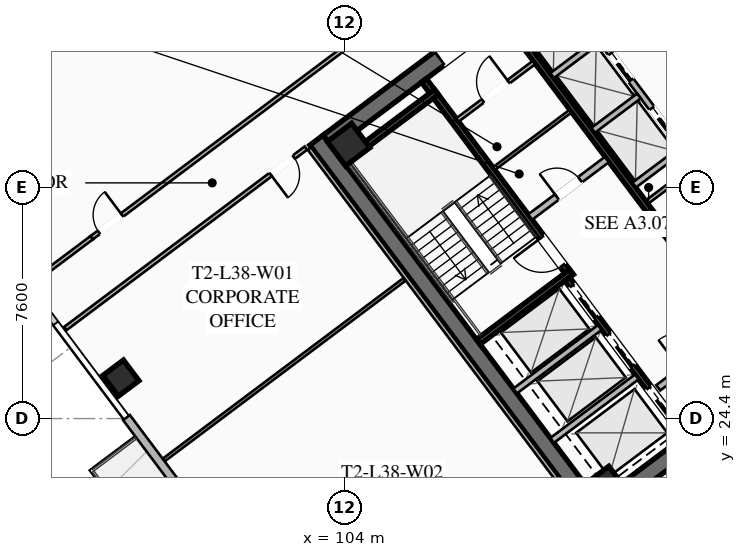
"""IFC4 building model, lengths in metres.
Left out: names, types, materials, properties, quantities, classifications, styles, units other than length and angle.
Written with IfcOpenShell. Run it as: python <this file> out.ifc"""

import sys

from ifc_helpers import new_model, si_unit, direction, frame, frame_2d, origin, origin_2d, place, context, subcontext, project, spatial, rectangle, hollow_rectangle, extrude, element, fill, save


model = new_model("IFC4")
c1 = context("Model", 3, precision=1e-05, world=origin(), true_north=direction((0.0, 1.0)))
c2 = subcontext(c1, "Body", "Model", "MODEL_VIEW")
j1 = project(units=[si_unit("LENGTHUNIT", "METRE"), si_unit("PLANEANGLEUNIT", "RADIAN")], contexts=[c1])
p1 = place(None, origin())
s1 = spatial("IfcSite", under=j1, at=p1, CompositionType="ELEMENT")
p2 = place(p1, origin())
s2 = spatial("IfcBuilding", under=s1, at=p2, CompositionType="ELEMENT")
p3 = place(p2, frame((0.0, 0.0, 142.8)))
s3 = spatial("IfcBuildingStorey", under=s2, at=p3, CompositionType="ELEMENT", Elevation=142.8)
p4 = place(p3, frame((112.436, 21.077, 0.0), z_axis=(0.0, 0.0, 1.0), x_axis=(-0.600005007985, 0.799996243986, 0.0)))
e1 = element("IfcWall", 1, at=p4, inside=s3, PredefinedType="SHEAR", context=c2, shape_type="SweptSolid", body=[
    extrude(rectangle(XDim=15.6, YDim=0.55, at=frame_2d((7.8, 0.0))), origin(), (0.0, 0.0, 1.0), 3.55),
])
p5 = place(p3, frame((124.539, 30.498, 0.0), z_axis=(0.0, 0.0, 1.0), x_axis=(-0.799998054672, -0.600002593761, 0.0)))
e2 = element("IfcWall", 2, at=p5, inside=s3, PredefinedType="SHEAR", context=c2, shape_type="SweptSolid", body=[
    extrude(rectangle(XDim=15.06, YDim=0.55, at=frame_2d((7.53, 0.0))), origin(), (0.0, 0.0, 1.0), 3.55),
])
p6 = place(p5, frame((9.23, 0.0, 0.0)))
e3 = element("IfcOpeningElement", 3, at=p6, cuts=e2, PredefinedType="OPENING", context=c2, shape_type="SweptSolid", body=[
    extrude(rectangle(XDim=1.25, YDim=2.25, at=frame_2d((0.625, 1.125))), frame((0.0, 0.285, 0.0), z_axis=(0.0, -1.0, 0.0), x_axis=(1.0, 0.0, 0.0)), (0.0, 0.0, 1.0), 0.57),
])
p7 = place(p5, frame((4.18, 0.0, 0.0)))
e4 = element("IfcOpeningElement", 4, at=p7, cuts=e2, PredefinedType="OPENING", context=c2, shape_type="SweptSolid", body=[
    extrude(rectangle(XDim=1.25, YDim=2.25, at=frame_2d((0.625, 1.125))), frame((0.0, 0.285, 0.0), z_axis=(0.0, -1.0, 0.0), x_axis=(1.0, 0.0, 0.0)), (0.0, 0.0, 1.0), 0.57),
])
p8 = place(p3, frame((103.461, 33.502, 0.0), z_axis=(0.0, 0.0, 1.0), x_axis=(0.799998054672, 0.600002593761, 0.0)))
e5 = element("IfcWall", 5, at=p8, inside=s3, PredefinedType="SHEAR", context=c2, shape_type="SweptSolid", body=[
    extrude(rectangle(XDim=15.06, YDim=0.55, at=frame_2d((7.53, 0.0))), origin(), (0.0, 0.0, 1.0), 3.55),
])
p9 = place(p8, frame((4.58, 0.0, 0.0)))
e6 = element("IfcOpeningElement", 6, at=p9, cuts=e5, PredefinedType="OPENING", context=c2, shape_type="SweptSolid", body=[
    extrude(rectangle(XDim=1.25, YDim=2.25, at=frame_2d((0.625, 1.125))), frame((0.0, 0.285, 0.0), z_axis=(0.0, -1.0, 0.0), x_axis=(1.0, 0.0, 0.0)), (0.0, 0.0, 1.0), 0.57),
])
p10 = place(p8, frame((9.63, 0.0, 0.0)))
e7 = element("IfcOpeningElement", 7, at=p10, cuts=e5, PredefinedType="OPENING", context=c2, shape_type="SweptSolid", body=[
    extrude(rectangle(XDim=1.25, YDim=2.25, at=frame_2d((0.625, 1.125))), frame((0.0, 0.285, 0.0), z_axis=(0.0, -1.0, 0.0), x_axis=(1.0, 0.0, 0.0)), (0.0, 0.0, 1.0), 0.57),
])
for number, where, z_axis, x_axis in (
    (8, (112.59, 22.13, 0.0), (0.0, 0.0, 1.0), (0.8, 0.6, 0.0)),
    (9, (104.13, 33.41, 0.0), (0.0, 0.0, 1.0), (0.8, 0.6, 0.0)),
):
    element("IfcColumn", number, at=place(p3, frame(where, z_axis=z_axis, x_axis=x_axis)), inside=s3, PredefinedType="COLUMN", context=c2, shape_type="SweptSolid", body=[
        extrude(hollow_rectangle(XDim=1.0, YDim=1.0, WallThickness=0.04, at=origin_2d()), origin(), (0.0, 0.0, 1.0), 3.37),
    ])
p11 = place(p3, frame((96.64, 25.73, 0.0), z_axis=(0.0, 0.0, 1.0), x_axis=(0.799999996291, 0.600000004945, 0.0)))
e10 = element("IfcColumn", 10, at=p11, inside=s3, PredefinedType="COLUMN", context=c2, shape_type="SweptSolid", body=[
    extrude(hollow_rectangle(XDim=0.85, YDim=0.85, WallThickness=0.035, at=origin_2d()), origin(), (0.0, 0.0, 1.0), 3.37),
])
p12 = place(p3, frame((101.926, 17.632, 0.0), z_axis=(0.0, 0.0, 1.0), x_axis=(-0.600018382406, 0.799986212866, 0.0)))
e11 = element("IfcWall", 11, at=p12, inside=s3, PredefinedType="SOLIDWALL", context=c2, shape_type="SweptSolid", body=[
    extrude(rectangle(XDim=8.5, YDim=0.28, at=frame_2d((4.25, 0.0))), origin(), (0.0, 0.0, 1.0), 3.37),
])
p13 = place(p12, frame((3.6, 0.0, 0.0)))
e12 = element("IfcOpeningElement", 12, at=p13, cuts=e11, PredefinedType="OPENING", context=c2, shape_type="SweptSolid", body=[
    extrude(rectangle(XDim=1.3, YDim=2.15, at=frame_2d((0.65, 1.075))), frame((0.0, 0.15, 0.0), z_axis=(0.0, -1.0, 0.0), x_axis=(1.0, 0.0, 0.0)), (0.0, 0.0, 1.0), 0.3),
])
p14 = place(p12, frame((1.46, 0.0, 0.85)))
e13 = element("IfcOpeningElement", 13, at=p14, cuts=e11, PredefinedType="OPENING", context=c2, shape_type="SweptSolid", body=[
    extrude(rectangle(XDim=1.8, YDim=1.92, at=frame_2d((0.9, 0.96))), frame((0.0, 0.15, 0.0), z_axis=(0.0, -1.0, 0.0), x_axis=(1.0, 0.0, 0.0)), (0.0, 0.0, 1.0), 0.3),
])
p15 = place(p3, frame((111.44, 29.08, 0.0), z_axis=(0.0, 0.0, 1.0), x_axis=(-0.59999029481, 0.8000072788, 0.0)))
e14 = element("IfcWall", 14, at=p15, inside=s3, PredefinedType="SHEAR", context=c2, shape_type="SweptSolid", body=[
    extrude(rectangle(XDim=8.05, YDim=0.2, at=frame_2d((4.025, 0.0))), origin(), (0.0, 0.0, 1.0), 3.37),
])
p16 = place(p15, frame((0.45, 0.0, 0.0)))
e15 = element("IfcOpeningElement", 15, at=p16, cuts=e14, PredefinedType="OPENING", context=c2, shape_type="SweptSolid", body=[
    extrude(rectangle(XDim=1.15, YDim=2.2, at=frame_2d((0.575, 1.1))), frame((0.0, 0.11, 0.0), z_axis=(0.0, -1.0, 0.0), x_axis=(1.0, 0.0, 0.0)), (0.0, 0.0, 1.0), 0.22),
])
for number, where, z_axis, x_axis in (
    (16, (108.396, 26.922, 0.0), (0.0, 0.0, 1.0), (0.8, 0.6, 0.0)),
    (17, (103.956, 32.842, 0.0), (0.0, 0.0, 1.0), (0.8, 0.6, 0.0)),
):
    element("IfcWall", number, at=place(p3, frame(where, z_axis=z_axis, x_axis=x_axis)), inside=s3, PredefinedType="SHEAR", context=c2, shape_type="SweptSolid", body=[
        extrude(rectangle(XDim=3.83, YDim=0.2, at=frame_2d((1.915, 0.0))), origin(), (0.0, 0.0, 1.0), 3.37),
    ])
p17 = place(p3, frame((117.998, 25.936, 0.0), z_axis=(0.0, 0.0, 1.0), x_axis=(-0.600002693989, 0.799997979501, 0.0)))
e18 = element("IfcWall", 18, at=p17, inside=s3, PredefinedType="SHEAR", context=c2, shape_type="SweptSolid", body=[
    extrude(rectangle(XDim=14.5, YDim=0.2, at=frame_2d((7.25, 0.0))), origin(), (0.0, 0.0, 1.0), 3.37),
])
p18 = place(p3, frame((110.104, 31.028, 0.0), z_axis=(0.0, 0.0, 1.0), x_axis=(0.800018601094, 0.59997519774, 0.0)))
e19 = element("IfcWall", 19, at=p18, inside=s3, PredefinedType="SOLIDWALL", context=c2, shape_type="SweptSolid", body=[
    extrude(rectangle(XDim=3.15, YDim=0.22, at=frame_2d((1.575, 0.0))), origin(), (0.0, 0.0, 1.0), 2.723),
])
p19 = place(p18, frame((1.1, 0.0, 0.0)))
e20 = element("IfcOpeningElement", 20, at=p19, cuts=e19, PredefinedType="OPENING", context=c2, shape_type="SweptSolid", body=[
    extrude(rectangle(XDim=0.95, YDim=2.05, at=frame_2d((0.475, 1.025))), frame((0.0, 0.12, 0.0), z_axis=(0.0, -1.0, 0.0), x_axis=(1.0, 0.0, 0.0)), (0.0, 0.0, 1.0), 0.24),
])
p20 = place(p3, frame((114.316, 25.412, 0.0), z_axis=(0.0, 0.0, 1.0), x_axis=(0.800018601094, 0.59997519774, 0.0)))
e21 = element("IfcWall", 21, at=p20, inside=s3, PredefinedType="SOLIDWALL", context=c2, shape_type="SweptSolid", body=[
    extrude(rectangle(XDim=3.15, YDim=0.22, at=frame_2d((1.575, 0.0))), origin(), (0.0, 0.0, 1.0), 2.723),
])
p21 = place(p20, frame((0.95, 0.0, 0.0)))
e22 = element("IfcOpeningElement", 22, at=p21, cuts=e21, PredefinedType="OPENING", context=c2, shape_type="SweptSolid", body=[
    extrude(rectangle(XDim=1.25, YDim=2.25, at=frame_2d((0.625, 1.125))), frame((0.0, 0.12, 0.0), z_axis=(0.0, -1.0, 0.0), x_axis=(1.0, 0.0, 0.0)), (0.0, 0.0, 1.0), 0.24),
])
p22 = place(p3, frame((115.19, 23.83, 0.0), z_axis=(0.0, 0.0, 1.0), x_axis=(-0.599993943644, 0.800004542231, 0.0)))
e23 = element("IfcWall", 23, at=p22, inside=s3, PredefinedType="SHEAR", context=c2, shape_type="SweptSolid", body=[
    extrude(rectangle(XDim=6.45, YDim=0.2, at=frame_2d((3.225, 0.0))), origin(), (0.0, 0.0, 1.0), 3.37),
])
p23 = place(p22, frame((4.875, 0.0, 0.0)))
e24 = element("IfcOpeningElement", 24, at=p23, cuts=e23, PredefinedType="OPENING", context=c2, shape_type="SweptSolid", body=[
    extrude(rectangle(XDim=1.3, YDim=2.25, at=frame_2d((0.65, 1.125))), frame((0.0, 0.11, 0.0), z_axis=(0.0, -1.0, 0.0), x_axis=(1.0, 0.0, 0.0)), (0.0, 0.0, 1.0), 0.22),
])
p24 = place(p22, frame((2.875, 0.0, 0.0)))
e25 = element("IfcOpeningElement", 25, at=p24, cuts=e23, PredefinedType="OPENING", context=c2, shape_type="SweptSolid", body=[
    extrude(rectangle(XDim=1.3, YDim=2.25, at=frame_2d((0.65, 1.125))), frame((0.0, 0.11, 0.0), z_axis=(0.0, -1.0, 0.0), x_axis=(1.0, 0.0, 0.0)), (0.0, 0.0, 1.0), 0.22),
])
p25 = place(p22, frame((0.675, 0.0, 0.0)))
e26 = element("IfcOpeningElement", 26, at=p25, cuts=e23, PredefinedType="OPENING", context=c2, shape_type="SweptSolid", body=[
    extrude(rectangle(XDim=1.3, YDim=2.25, at=frame_2d((0.65, 1.125))), frame((0.0, 0.11, 0.0), z_axis=(0.0, -1.0, 0.0), x_axis=(1.0, 0.0, 0.0)), (0.0, 0.0, 1.0), 0.22),
])
for number, where, z_axis, x_axis in (
    (27, (110.826, 23.682, 0.0), (0.0, 0.0, 1.0), (0.8, 0.6, 0.0)),
    (28, (109.608, 25.306, 0.0), (0.0, 0.0, 1.0), (0.8, 0.6, 0.0)),
):
    element("IfcWall", number, at=place(p3, frame(where, z_axis=z_axis, x_axis=x_axis)), inside=s3, PredefinedType="SOLIDWALL", context=c2, shape_type="SweptSolid", body=[
        extrude(rectangle(XDim=3.48, YDim=0.2, at=frame_2d((1.74, 0.0))), origin(), (0.0, 0.0, 1.0), 3.37),
    ])
p26 = place(p3, frame((112.81, 40.17, 0.0), z_axis=(0.0, 0.0, 1.0), x_axis=(0.599993943644, -0.800004542231, 0.0)))
e29 = element("IfcWall", 29, at=p26, inside=s3, PredefinedType="SHEAR", context=c2, shape_type="SweptSolid", body=[
    extrude(rectangle(XDim=6.45, YDim=0.2, at=frame_2d((3.225, 0.0))), origin(), (0.0, 0.0, 1.0), 3.37),
])
p27 = place(p3, frame((107.71, 34.22, 0.0), z_axis=(0.0, 0.0, 1.0), x_axis=(0.799981399002, 0.60002480053, 0.0)))
e30 = element("IfcWall", 30, at=p27, inside=s3, PredefinedType="PARTITIONING", context=c2, shape_type="SweptSolid", body=[
    extrude(rectangle(XDim=3.15, YDim=0.135, at=frame_2d((1.575, 0.0))), origin(), (0.0, 0.0, 1.0), 2.723),
])
p28 = place(p27, frame((1.05, 0.0, 0.0)))
e31 = element("IfcOpeningElement", 31, at=p28, cuts=e30, PredefinedType="OPENING", context=c2, shape_type="SweptSolid", body=[
    extrude(rectangle(XDim=1.05, YDim=2.2, at=frame_2d((0.525, 1.1))), frame((0.0, 0.077, 0.0), z_axis=(0.0, -1.0, 0.0), x_axis=(1.0, 0.0, 0.0)), (0.0, 0.0, 1.0), 0.155),
])
p29 = place(p3, frame((108.91, 32.62, 0.0), z_axis=(0.0, 0.0, 1.0), x_axis=(0.800018601094, 0.59997519774, 0.0)))
e32 = element("IfcWall", 32, at=p29, inside=s3, PredefinedType="PARTITIONING", context=c2, shape_type="SweptSolid", body=[
    extrude(rectangle(XDim=3.15, YDim=0.11, at=frame_2d((1.575, 0.0))), origin(), (0.0, 0.0, 1.0), 2.723),
])
p30 = place(p3, frame((113.946, 31.522, 0.0), z_axis=(0.0, 0.0, 1.0), x_axis=(0.8, 0.6, 0.0)))
e33 = element("IfcWall", 33, at=p30, inside=s3, PredefinedType="PARTITIONING", context=c2, shape_type="SweptSolid", body=[
    extrude(rectangle(XDim=1.88, YDim=0.135, at=frame_2d((0.94, 0.0))), origin(), (0.0, 0.0, 1.0), 2.723),
])
p31 = place(p3, frame((115.11, 33.27, 0.0), z_axis=(0.0, 0.0, 1.0), x_axis=(-0.600011322243, 0.799991508192, 0.0)))
e34 = element("IfcWall", 34, at=p31, inside=s3, PredefinedType="SOLIDWALL", context=c2, shape_type="SweptSolid", body=[
    extrude(rectangle(XDim=6.9, YDim=0.2, at=frame_2d((3.45, 0.0))), origin(), (0.0, 0.0, 1.0), 3.37),
])
p32 = place(p31, frame((0.575, 0.0, 0.0)))
e35 = element("IfcOpeningElement", 35, at=p32, cuts=e34, PredefinedType="OPENING", context=c2, shape_type="SweptSolid", body=[
    extrude(rectangle(XDim=1.1, YDim=2.2, at=frame_2d((0.55, 1.1))), frame((0.0, 0.11, 0.0), z_axis=(0.0, -1.0, 0.0), x_axis=(1.0, 0.0, 0.0)), (0.0, 0.0, 1.0), 0.22),
])
p33 = place(p31, frame((2.825, 0.0, 0.0)))
e36 = element("IfcOpeningElement", 36, at=p33, cuts=e34, PredefinedType="OPENING", context=c2, shape_type="SweptSolid", body=[
    extrude(rectangle(XDim=1.1, YDim=2.2, at=frame_2d((0.55, 1.1))), frame((0.0, 0.11, 0.0), z_axis=(0.0, -1.0, 0.0), x_axis=(1.0, 0.0, 0.0)), (0.0, 0.0, 1.0), 0.22),
])
p34 = place(p31, frame((5.075, 0.0, 0.0)))
e37 = element("IfcOpeningElement", 37, at=p34, cuts=e34, PredefinedType="OPENING", context=c2, shape_type="SweptSolid", body=[
    extrude(rectangle(XDim=1.1, YDim=2.2, at=frame_2d((0.55, 1.1))), frame((0.0, 0.11, 0.0), z_axis=(0.0, -1.0, 0.0), x_axis=(1.0, 0.0, 0.0)), (0.0, 0.0, 1.0), 0.22),
])
p35 = place(p3, frame((113.526, 32.082, 0.0), z_axis=(0.0, 0.0, 1.0), x_axis=(0.800046745961, 0.599937666993, 0.0)))
e38 = element("IfcWall", 38, at=p35, inside=s3, PredefinedType="SOLIDWALL", context=c2, shape_type="SweptSolid", body=[
    extrude(rectangle(XDim=1.88, YDim=0.2, at=frame_2d((0.94, 0.0))), origin(), (0.0, 0.0, 1.0), 3.37),
])
p36 = place(p3, frame((112.176, 33.882, 0.0), z_axis=(0.0, 0.0, 1.0), x_axis=(0.8, 0.6, 0.0)))
e39 = element("IfcWall", 39, at=p36, inside=s3, PredefinedType="SOLIDWALL", context=c2, shape_type="SweptSolid", body=[
    extrude(rectangle(XDim=1.88, YDim=0.2, at=frame_2d((0.94, 0.0))), origin(), (0.0, 0.0, 1.0), 3.37),
])
p37 = place(p3, frame((110.826, 35.682, 0.0), z_axis=(0.0, 0.0, 1.0), x_axis=(0.799984418148, 0.600020775241, 0.0)))
e40 = element("IfcWall", 40, at=p37, inside=s3, PredefinedType="SOLIDWALL", context=c2, shape_type="SweptSolid", body=[
    extrude(rectangle(XDim=1.88, YDim=0.2, at=frame_2d((0.94, 0.0))), origin(), (0.0, 0.0, 1.0), 3.37),
])
p38 = place(p3, frame((95.678, 30.346, 0.0), z_axis=(0.0, 0.0, 1.0), x_axis=(0.8, 0.6, 0.0)))
e41 = element("IfcWall", 41, at=p38, inside=s3, PredefinedType="PARTITIONING", context=c2, shape_type="SweptSolid", body=[
    extrude(rectangle(XDim=31.3, YDim=0.135, at=frame_2d((15.65, 0.0))), origin(), (0.0, 0.0, 1.0), 2.723),
])
p39 = place(p38, frame((0.3, 0.0, 0.0)))
e42 = element("IfcOpeningElement", 42, at=p39, cuts=e41, PredefinedType="OPENING", context=c2, shape_type="SweptSolid", body=[
    extrude(rectangle(XDim=0.95, YDim=2.05, at=frame_2d((0.475, 1.025))), frame((0.0, 0.077, 0.0), z_axis=(0.0, -1.0, 0.0), x_axis=(1.0, 0.0, 0.0)), (0.0, 0.0, 1.0), 0.155),
])
p40 = place(p38, frame((30.05, 0.0, 0.0)))
e43 = element("IfcOpeningElement", 43, at=p40, cuts=e41, PredefinedType="OPENING", context=c2, shape_type="SweptSolid", body=[
    extrude(rectangle(XDim=0.95, YDim=2.05, at=frame_2d((0.475, 1.025))), frame((0.0, 0.077, 0.0), z_axis=(0.0, -1.0, 0.0), x_axis=(1.0, 0.0, 0.0)), (0.0, 0.0, 1.0), 0.155),
])
p41 = place(p3, frame((93.574, 28.768, 0.0), z_axis=(0.0, 0.0, 1.0), x_axis=(0.80002227902, 0.599970293491, 0.0)))
e44 = element("IfcWall", 44, at=p41, inside=s3, PredefinedType="PARTITIONING", context=c2, shape_type="SweptSolid", body=[
    extrude(rectangle(XDim=2.63, YDim=0.135, at=frame_2d((1.315, 0.0))), origin(), (0.0, 0.0, 1.0), 2.723),
])
p42 = place(p3, frame((132.13, 33.91, 0.0), z_axis=(0.0, 0.0, 1.0), x_axis=(-0.799997191971, -0.600003744021, 0.0)))
e45 = element("IfcWall", 45, at=p42, inside=s3, PredefinedType="PARTITIONING", context=c2, shape_type="SweptSolid", body=[
    extrude(rectangle(XDim=31.3, YDim=0.135, at=frame_2d((15.65, 0.0))), origin(), (0.0, 0.0, 1.0), 2.723),
])
p43 = place(p42, frame((29.97, 0.0, 0.0)))
e46 = element("IfcOpeningElement", 46, at=p43, cuts=e45, PredefinedType="OPENING", context=c2, shape_type="SweptSolid", body=[
    extrude(rectangle(XDim=0.95, YDim=2.05, at=frame_2d((0.475, 1.025))), frame((0.0, 0.077, 0.0), z_axis=(0.0, -1.0, 0.0), x_axis=(1.0, 0.0, 0.0)), (0.0, 0.0, 1.0), 0.155),
])
p44 = place(p42, frame((0.38, 0.0, 0.0)))
e47 = element("IfcOpeningElement", 47, at=p44, cuts=e45, PredefinedType="OPENING", context=c2, shape_type="SweptSolid", body=[
    extrude(rectangle(XDim=0.95, YDim=2.05, at=frame_2d((0.475, 1.025))), frame((0.0, 0.077, 0.0), z_axis=(0.0, -1.0, 0.0), x_axis=(1.0, 0.0, 0.0)), (0.0, 0.0, 1.0), 0.155),
])
p45 = place(p3, frame((112.104, 20.928, 0.0), z_axis=(0.0, 0.0, 1.0), x_axis=(-0.599994940075, 0.800003794918, 0.0)))
e48 = element("IfcWall", 48, at=p45, inside=s3, PredefinedType="PARTITIONING", context=c2, shape_type="SweptSolid", body=[
    extrude(rectangle(XDim=15.44, YDim=0.135, at=frame_2d((7.72, 0.0))), origin(), (0.0, 0.0, 1.0), 2.723),
])
p46 = place(p3, frame((102.728, 33.296, 0.0), z_axis=(0.0, 0.0, 1.0), x_axis=(-0.800011848946, -0.599984201081, 0.0)))
e49 = element("IfcWall", 49, at=p46, inside=s3, PredefinedType="PARTITIONING", context=c2, shape_type="SweptSolid", body=[
    extrude(rectangle(XDim=9.89, YDim=0.135, at=frame_2d((4.945, 0.0))), origin(), (0.0, 0.0, 1.0), 2.723),
])
p47 = place(p46, frame((0.5, 0.0, 0.0)))
e50 = element("IfcOpeningElement", 50, at=p47, cuts=e49, PredefinedType="OPENING", context=c2, shape_type="SweptSolid", body=[
    extrude(rectangle(XDim=0.95, YDim=2.05, at=frame_2d((0.475, 1.025))), frame((0.0, 0.077, 0.0), z_axis=(0.0, -1.0, 0.0), x_axis=(1.0, 0.0, 0.0)), (0.0, 0.0, 1.0), 0.155),
])
p48 = place(p3, frame((98.056, 23.042, 0.0), z_axis=(0.0, 0.0, 1.0), x_axis=(0.8, 0.6, 0.0)))
e51 = element("IfcWall", 51, at=p48, inside=s3, PredefinedType="PARTITIONING", context=c2, shape_type="SweptSolid", body=[
    extrude(rectangle(XDim=9.89, YDim=0.11, at=frame_2d((4.945, 0.0))), origin(), (0.0, 0.0, 1.0), 2.723),
])
p49 = place(p9, origin())
e52 = element("IfcDoor", 52, at=p49, inside=s3, OperationType="SINGLE_SWING_LEFT", PredefinedType="DOOR", context=c2, shape_type="SweptSolid", body=[
    extrude(rectangle(XDim=1.25, YDim=2.25, at=frame_2d((0.625, 1.125))), frame((0.0, 0.025, 0.0), z_axis=(0.0, -1.0, 0.0), x_axis=(1.0, 0.0, 0.0)), (0.0, 0.0, 1.0), 0.05),
])
fill(e6, e52)
p50 = place(p16, origin())
e53 = element("IfcDoor", 53, at=p50, inside=s3, OperationType="SINGLE_SWING_RIGHT", PredefinedType="DOOR", context=c2, shape_type="SweptSolid", body=[
    extrude(rectangle(XDim=1.15, YDim=2.2, at=frame_2d((0.575, 1.1))), frame((0.0, 0.025, 0.0), z_axis=(0.0, -1.0, 0.0), x_axis=(1.0, 0.0, 0.0)), (0.0, 0.0, 1.0), 0.05),
])
fill(e15, e53)
p51 = place(p28, origin())
e54 = element("IfcDoor", 54, at=p51, inside=s3, OperationType="SINGLE_SWING_RIGHT", PredefinedType="DOOR", context=c2, shape_type="SweptSolid", body=[
    extrude(rectangle(XDim=1.05, YDim=2.2, at=frame_2d((0.525, 1.1))), frame((0.0, 0.025, 0.0), z_axis=(0.0, -1.0, 0.0), x_axis=(1.0, 0.0, 0.0)), (0.0, 0.0, 1.0), 0.05),
])
fill(e31, e54)
p52 = place(p19, origin())
e55 = element("IfcDoor", 55, at=p52, inside=s3, OperationType="SINGLE_SWING_LEFT", PredefinedType="DOOR", context=c2, shape_type="SweptSolid", body=[
    extrude(rectangle(XDim=0.95, YDim=2.05, at=frame_2d((0.475, 1.025))), frame((0.0, 0.025, 0.0), z_axis=(0.0, -1.0, 0.0), x_axis=(1.0, 0.0, 0.0)), (0.0, 0.0, 1.0), 0.05),
])
fill(e20, e55)
p53 = place(p39, origin())
e56 = element("IfcDoor", 56, at=p53, inside=s3, OperationType="SINGLE_SWING_RIGHT", PredefinedType="DOOR", context=c2, shape_type="SweptSolid", body=[
    extrude(rectangle(XDim=0.95, YDim=2.05, at=frame_2d((0.475, 1.025))), frame((0.0, 0.025, 0.0), z_axis=(0.0, -1.0, 0.0), x_axis=(1.0, 0.0, 0.0)), (0.0, 0.0, 1.0), 0.05),
])
fill(e42, e56)
p54 = place(p47, origin())
e57 = element("IfcDoor", 57, at=p54, inside=s3, OperationType="SINGLE_SWING_RIGHT", PredefinedType="DOOR", context=c2, shape_type="SweptSolid", body=[
    extrude(rectangle(XDim=0.95, YDim=2.05, at=frame_2d((0.475, 1.025))), frame((0.0, 0.025, 0.0), z_axis=(0.0, -1.0, 0.0), x_axis=(1.0, 0.0, 0.0)), (0.0, 0.0, 1.0), 0.05),
])
fill(e50, e57)
p55 = place(p23, origin())
e58 = element("IfcDoor", 58, at=p55, inside=s3, OperationType="SLIDING_TO_LEFT", PredefinedType="DOOR", context=c2, shape_type="SweptSolid", body=[
    extrude(rectangle(XDim=1.3, YDim=2.25, at=frame_2d((0.65, 1.125))), frame((0.0, 0.025, 0.0), z_axis=(0.0, -1.0, 0.0), x_axis=(1.0, 0.0, 0.0)), (0.0, 0.0, 1.0), 0.05),
])
fill(e24, e58)
p56 = place(p24, origin())
e59 = element("IfcDoor", 59, at=p56, inside=s3, OperationType="SLIDING_TO_LEFT", PredefinedType="DOOR", context=c2, shape_type="SweptSolid", body=[
    extrude(rectangle(XDim=1.3, YDim=2.25, at=frame_2d((0.65, 1.125))), frame((0.0, 0.025, 0.0), z_axis=(0.0, -1.0, 0.0), x_axis=(1.0, 0.0, 0.0)), (0.0, 0.0, 1.0), 0.05),
])
fill(e25, e59)
p57 = place(p25, origin())
e60 = element("IfcDoor", 60, at=p57, inside=s3, OperationType="SLIDING_TO_LEFT", PredefinedType="DOOR", context=c2, shape_type="SweptSolid", body=[
    extrude(rectangle(XDim=1.3, YDim=2.25, at=frame_2d((0.65, 1.125))), frame((0.0, 0.025, 0.0), z_axis=(0.0, -1.0, 0.0), x_axis=(1.0, 0.0, 0.0)), (0.0, 0.0, 1.0), 0.05),
])
fill(e26, e60)
p58 = place(p32, origin())
e61 = element("IfcDoor", 61, at=p58, inside=s3, OperationType="SLIDING_TO_LEFT", PredefinedType="DOOR", context=c2, shape_type="SweptSolid", body=[
    extrude(rectangle(XDim=1.1, YDim=2.2, at=frame_2d((0.55, 1.1))), frame((0.0, 0.025, 0.0), z_axis=(0.0, -1.0, 0.0), x_axis=(1.0, 0.0, 0.0)), (0.0, 0.0, 1.0), 0.05),
])
fill(e35, e61)
p59 = place(p33, origin())
e62 = element("IfcDoor", 62, at=p59, inside=s3, OperationType="SLIDING_TO_LEFT", PredefinedType="DOOR", context=c2, shape_type="SweptSolid", body=[
    extrude(rectangle(XDim=1.1, YDim=2.2, at=frame_2d((0.55, 1.1))), frame((0.0, 0.025, 0.0), z_axis=(0.0, -1.0, 0.0), x_axis=(1.0, 0.0, 0.0)), (0.0, 0.0, 1.0), 0.05),
])
fill(e36, e62)
save(model, sys.argv[1])
